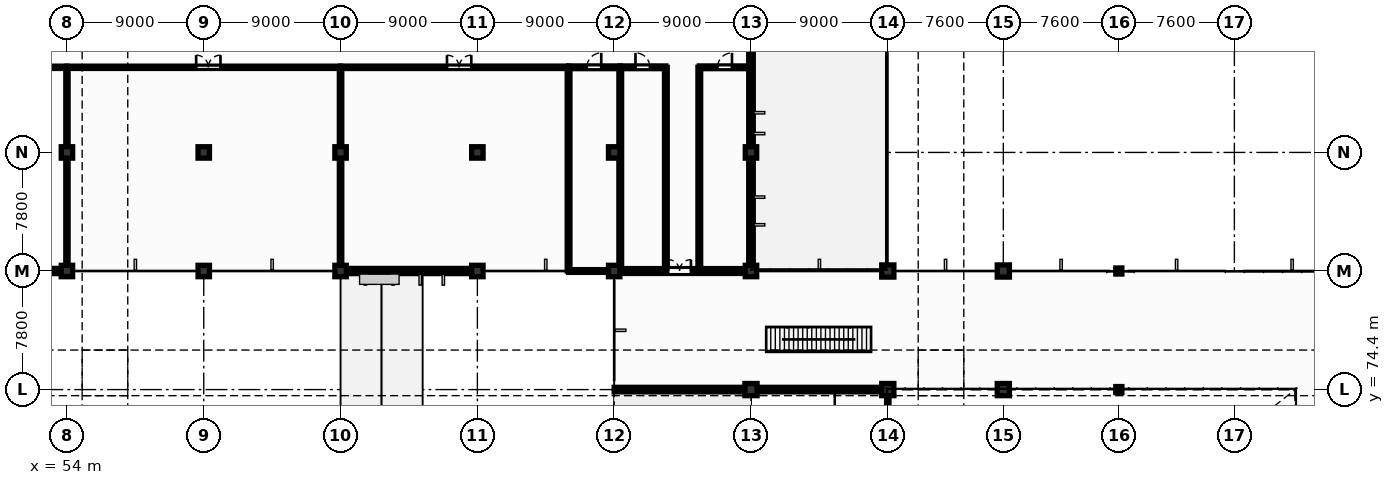
"""IFC4 building model, lengths in metres.
Left out: names, types, materials, properties, quantities, classifications, styles, units other than length and angle.
Written with IfcOpenShell. Run it as: python <this file> out.ifc"""

import sys

from ifc_helpers import new_model, si_unit, direction, frame, frame_2d, origin, origin_2d, place, context, subcontext, project, spatial, rectangle, i_section, extrude, element, fill, save


model = new_model("IFC4")
c1 = context("Model", 3, precision=1e-05, world=origin(), true_north=direction((0.0, 1.0)))
c2 = subcontext(c1, "Body", "Model", "MODEL_VIEW")
j1 = project(units=[si_unit("LENGTHUNIT", "METRE"), si_unit("PLANEANGLEUNIT", "RADIAN")], contexts=[c1])
p1 = place(None, origin())
s1 = spatial("IfcSite", under=j1, at=p1, CompositionType="ELEMENT")
p2 = place(p1, origin())
s2 = spatial("IfcBuilding", under=s1, at=p2, CompositionType="ELEMENT")
p3 = place(p2, frame((0.0, 0.0, 8.94)))
s3 = spatial("IfcBuildingStorey", under=s2, at=p3, CompositionType="ELEMENT", Elevation=8.94)
for number, where, z_axis, x_axis in (
    (1, (54.0, 82.2, 0.0), (0.0, 0.0, 1.0), (1.0, 0.0, 0.0)),
    (2, (54.0, 90.0, 0.0), (0.0, 0.0, 1.0), (1.0, 0.0, 0.0)),
    (3, (63.0, 82.2, 0.0), (0.0, 0.0, 1.0), (1.0, 0.0, 0.0)),
    (4, (63.0, 90.0, 0.0), (0.0, 0.0, 1.0), (1.0, 0.0, 0.0)),
    (5, (72.0, 82.2, 0.0), (0.0, 0.0, 1.0), (1.0, 0.0, 0.0)),
    (6, (72.0, 90.0, 0.0), (0.0, 0.0, 1.0), (1.0, 0.0, 0.0)),
    (7, (81.0, 82.2, 0.0), (0.0, 0.0, 1.0), (1.0, 0.0, 0.0)),
    (8, (81.0, 90.0, 0.0), (0.0, 0.0, 1.0), (1.0, 0.0, 0.0)),
    (9, (90.0, 82.2, 0.0), (0.0, 0.0, 1.0), (1.0, 0.0, 0.0)),
    (10, (90.0, 90.0, 0.0), (0.0, 0.0, 1.0), (1.0, 0.0, 0.0)),
):
    element("IfcColumn", number, at=place(p3, frame(where, z_axis=z_axis, x_axis=x_axis)), inside=s3, PredefinedType="COLUMN", context=c2, shape_type="SweptSolid", body=[
        extrude(rectangle(XDim=0.75, YDim=0.75, at=origin_2d()), origin(), (0.0, 0.0, 1.0), 3.84),
    ])
p4 = place(p3, frame((99.0, 74.4, 0.0), z_axis=(0.0, 0.0, 1.0), x_axis=(1.0, 0.0, 0.0)))
e11 = element("IfcColumn", 11, at=p4, inside=s3, PredefinedType="COLUMN", context=c2, shape_type="SweptSolid", body=[
    extrude(rectangle(XDim=0.8, YDim=0.8, at=origin_2d()), origin(), (0.0, 0.0, 1.0), 0.605),
])
for number, where, z_axis, x_axis in (
    (12, (99.0, 82.2, 0.0), (0.0, 0.0, 1.0), (1.0, 0.0, 0.0)),
    (13, (99.0, 90.0, 0.0), (0.0, 0.0, 1.0), (1.0, 0.0, 0.0)),
):
    element("IfcColumn", number, at=place(p3, frame(where, z_axis=z_axis, x_axis=x_axis)), inside=s3, PredefinedType="COLUMN", context=c2, shape_type="SweptSolid", body=[
        extrude(rectangle(XDim=0.75, YDim=0.75, at=origin_2d()), origin(), (0.0, 0.0, 1.0), 3.84),
    ])
for number, where, z_axis, x_axis in (
    (14, (108.0, 74.4, 0.0), (0.0, 0.0, 1.0), (1.0, 0.0, 0.0)),
    (15, (108.0, 82.2, 0.0), (0.0, 0.0, 1.0), (1.0, 0.0, 0.0)),
    (16, (115.6, 74.4, 0.0), (0.0, 0.0, 1.0), (1.0, 0.0, 0.0)),
    (17, (115.6, 82.2, 0.0), (0.0, 0.0, 1.0), (1.0, 0.0, 0.0)),
):
    element("IfcColumn", number, at=place(p3, frame(where, z_axis=z_axis, x_axis=x_axis)), inside=s3, PredefinedType="COLUMN", context=c2, shape_type="SweptSolid", body=[
        extrude(rectangle(XDim=0.8, YDim=0.8, at=origin_2d()), origin(), (0.0, 0.0, 1.0), 3.84),
    ])
for number, where, z_axis, x_axis in (
    (18, (123.2, 74.4, 0.0), (0.0, 0.0, 1.0), (1.0, 0.0, 0.0)),
    (19, (123.2, 82.2, 0.0), (0.0, 0.0, 1.0), (1.0, 0.0, 0.0)),
):
    element("IfcColumn", number, at=place(p3, frame(where, z_axis=z_axis, x_axis=x_axis)), inside=s3, PredefinedType="COLUMN", context=c2, shape_type="SweptSolid", body=[
        extrude(i_section(OverallWidth=0.401, OverallDepth=0.399, WebThickness=0.025, FlangeThickness=0.04, at=origin_2d()), origin(), (0.0, 0.0, 1.0), 3.84),
    ])
p5 = place(p3, frame((45.0, 82.2, 0.0), z_axis=(0.0, 0.0, 1.0), x_axis=(1.0, 0.0, 0.0)))
e20 = element("IfcWall", 20, at=p5, inside=s3, PredefinedType="SOLIDWALL", context=c2, shape_type="SweptSolid", body=[
    extrude(rectangle(XDim=9.0, YDim=0.34, at=frame_2d((4.5, 0.0))), origin(), (0.0, 0.0, 1.0), 3.53),
])
p6 = place(p5, frame((1.8, 0.0, 0.665)))
e21 = element("IfcOpeningElement", 21, at=p6, cuts=e20, PredefinedType="OPENING", context=c2, shape_type="SweptSolid", body=[
    extrude(rectangle(XDim=1.5, YDim=2.1, at=frame_2d((0.75, 1.05))), frame((0.0, 0.18, 0.0), z_axis=(0.0, -1.0, 0.0), x_axis=(1.0, 0.0, 0.0)), (0.0, 0.0, 1.0), 0.36),
])
p7 = place(p5, frame((5.4, 0.0, 0.665)))
e22 = element("IfcOpeningElement", 22, at=p7, cuts=e20, PredefinedType="OPENING", context=c2, shape_type="SweptSolid", body=[
    extrude(rectangle(XDim=1.2, YDim=2.1, at=frame_2d((0.6, 1.05))), frame((0.0, 0.18, 0.0), z_axis=(0.0, -1.0, 0.0), x_axis=(1.0, 0.0, 0.0)), (0.0, 0.0, 1.0), 0.36),
])
p8 = place(p3, frame((72.0, 82.2, 0.0), z_axis=(0.0, 0.0, 1.0), x_axis=(1.0, 0.0, 0.0)))
e23 = element("IfcWall", 23, at=p8, inside=s3, PredefinedType="SOLIDWALL", context=c2, shape_type="SweptSolid", body=[
    extrude(rectangle(XDim=9.0, YDim=0.34, at=frame_2d((4.5, 0.0))), origin(), (0.0, 0.0, 1.0), 3.53),
])
p9 = place(p8, frame((1.8, 0.0, 0.665)))
e24 = element("IfcOpeningElement", 24, at=p9, cuts=e23, PredefinedType="OPENING", context=c2, shape_type="SweptSolid", body=[
    extrude(rectangle(XDim=1.5, YDim=2.1, at=frame_2d((0.75, 1.05))), frame((0.0, 0.18, 0.0), z_axis=(0.0, -1.0, 0.0), x_axis=(1.0, 0.0, 0.0)), (0.0, 0.0, 1.0), 0.36),
])
p10 = place(p8, frame((5.4, 0.0, 0.665)))
e25 = element("IfcOpeningElement", 25, at=p10, cuts=e23, PredefinedType="OPENING", context=c2, shape_type="SweptSolid", body=[
    extrude(rectangle(XDim=1.2, YDim=2.1, at=frame_2d((0.6, 1.05))), frame((0.0, 0.18, 0.0), z_axis=(0.0, -1.0, 0.0), x_axis=(1.0, 0.0, 0.0)), (0.0, 0.0, 1.0), 0.36),
])
p11 = place(p3, frame((99.0, 82.2, 0.0), z_axis=(0.0, 0.0, 1.0), x_axis=(0.0, 1.0, 0.0)))
e26 = element("IfcWall", 26, at=p11, inside=s3, PredefinedType="SOLIDWALL", context=c2, shape_type="SweptSolid", body=[
    extrude(rectangle(XDim=31.8, YDim=0.3, at=frame_2d((15.9, 0.0))), origin(), (0.0, 0.0, 1.0), 2.695),
])
p12 = place(p11, frame((18.2, 0.0, 0.0)))
e27 = element("IfcOpeningElement", 27, at=p12, cuts=e26, PredefinedType="OPENING", context=c2, shape_type="SweptSolid", body=[
    extrude(rectangle(XDim=1.6, YDim=2.25, at=frame_2d((0.8, 1.125))), frame((0.0, 0.16, 0.0), z_axis=(0.0, -1.0, 0.0), x_axis=(1.0, 0.0, 0.0)), (0.0, 0.0, 1.0), 0.32),
])
p13 = place(p11, frame((3.2, 0.0, 0.475)))
e28 = element("IfcOpeningElement", 28, at=p13, cuts=e26, PredefinedType="OPENING", context=c2, shape_type="SweptSolid", body=[
    extrude(rectangle(XDim=1.5, YDim=2.1, at=frame_2d((0.75, 1.05))), frame((0.0, 0.16, 0.0), z_axis=(0.0, -1.0, 0.0), x_axis=(1.0, 0.0, 0.0)), (0.0, 0.0, 1.0), 0.32),
])
p14 = place(p11, frame((9.2, 0.0, 0.825)))
e29 = element("IfcOpeningElement", 29, at=p14, cuts=e26, PredefinedType="OPENING", context=c2, shape_type="SweptSolid", body=[
    extrude(rectangle(XDim=1.05, YDim=1.75, at=frame_2d((0.525, 0.875))), frame((0.0, 0.16, 0.0), z_axis=(0.0, -1.0, 0.0), x_axis=(1.0, 0.0, 0.0)), (0.0, 0.0, 1.0), 0.32),
])
p15 = place(p3, frame((90.0, 74.4, 0.0), z_axis=(0.0, 0.0, 1.0), x_axis=(1.0, 0.0, 0.0)))
e30 = element("IfcWall", 30, at=p15, inside=s3, PredefinedType="SOLIDWALL", context=c2, shape_type="SweptSolid", body=[
    extrude(rectangle(XDim=18.0, YDim=0.3, at=frame_2d((9.0, 0.0))), origin(), (0.0, 0.0, 1.0), 4.65),
])
p16 = place(p15, frame((3.0, 0.0, 3.23)))
e31 = element("IfcOpeningElement", 31, at=p16, cuts=e30, PredefinedType="OPENING", context=c2, shape_type="SweptSolid", body=[
    extrude(rectangle(XDim=2.6, YDim=1.3, at=frame_2d((1.3, 0.65))), frame((0.0, 0.16, 0.0), z_axis=(0.0, -1.0, 0.0), x_axis=(1.0, 0.0, 0.0)), (0.0, 0.0, 1.0), 0.32),
])
p17 = place(p15, frame((11.0, 0.0, 3.23)))
e32 = element("IfcOpeningElement", 32, at=p17, cuts=e30, PredefinedType="OPENING", context=c2, shape_type="SweptSolid", body=[
    extrude(rectangle(XDim=2.6, YDim=1.3, at=frame_2d((1.3, 0.65))), frame((0.0, 0.16, 0.0), z_axis=(0.0, -1.0, 0.0), x_axis=(1.0, 0.0, 0.0)), (0.0, 0.0, 1.0), 0.32),
])
p18 = place(p3, frame((90.0, 82.2, 0.0), z_axis=(0.0, 0.0, 1.0), x_axis=(1.0, 0.0, 0.0)))
e33 = element("IfcWall", 33, at=p18, inside=s3, PredefinedType="SHEAR", context=c2, shape_type="SweptSolid", body=[
    extrude(rectangle(XDim=9.0, YDim=0.32, at=frame_2d((4.5, 0.0))), origin(), (0.0, 0.0, 1.0), 3.53),
])
p19 = place(p18, frame((3.55, 0.0, 0.0)))
e34 = element("IfcOpeningElement", 34, at=p19, cuts=e33, PredefinedType="OPENING", context=c2, shape_type="SweptSolid", body=[
    extrude(rectangle(XDim=1.5, YDim=2.2, at=frame_2d((0.75, 1.1))), frame((0.0, 0.17, 0.0), z_axis=(0.0, -1.0, 0.0), x_axis=(1.0, 0.0, 0.0)), (0.0, 0.0, 1.0), 0.34),
])
p20 = place(p3, frame((36.0, 95.6, 0.0), z_axis=(0.0, 0.0, 1.0), x_axis=(1.0, 0.0, 0.0)))
e35 = element("IfcWall", 35, at=p20, inside=s3, PredefinedType="PARTITIONING", context=c2, shape_type="SweptSolid", body=[
    extrude(rectangle(XDim=18.0, YDim=0.15, at=frame_2d((9.0, 0.0))), origin(), (0.0, 0.0, 1.0), 2.705),
])
p21 = place(p20, frame((8.5, 0.0, 0.0)))
e36 = element("IfcOpeningElement", 36, at=p21, cuts=e35, PredefinedType="OPENING", context=c2, shape_type="SweptSolid", body=[
    extrude(rectangle(XDim=1.6, YDim=2.2, at=frame_2d((0.8, 1.1))), frame((0.0, 0.085, 0.0), z_axis=(0.0, -1.0, 0.0), x_axis=(1.0, 0.0, 0.0)), (0.0, 0.0, 1.0), 0.17),
])
p22 = place(p3, frame((54.0, 95.6, 0.0), z_axis=(0.0, 0.0, 1.0), x_axis=(1.0, 0.0, 0.0)))
e37 = element("IfcWall", 37, at=p22, inside=s3, PredefinedType="PARTITIONING", context=c2, shape_type="SweptSolid", body=[
    extrude(rectangle(XDim=18.0, YDim=0.15, at=frame_2d((9.0, 0.0))), origin(), (0.0, 0.0, 1.0), 2.705),
])
p23 = place(p22, frame((8.5, 0.0, 0.0)))
e38 = element("IfcOpeningElement", 38, at=p23, cuts=e37, PredefinedType="OPENING", context=c2, shape_type="SweptSolid", body=[
    extrude(rectangle(XDim=1.6, YDim=2.2, at=frame_2d((0.8, 1.1))), frame((0.0, 0.085, 0.0), z_axis=(0.0, -1.0, 0.0), x_axis=(1.0, 0.0, 0.0)), (0.0, 0.0, 1.0), 0.17),
])
p24 = place(p3, frame((54.0, 82.2, 0.0), z_axis=(0.0, 0.0, 1.0), x_axis=(0.0, 1.0, 0.0)))
e39 = element("IfcWall", 39, at=p24, inside=s3, PredefinedType="PARTITIONING", context=c2, shape_type="SweptSolid", body=[
    extrude(rectangle(XDim=13.4, YDim=0.15, at=frame_2d((6.7, 0.0))), origin(), (0.0, 0.0, 1.0), 2.705),
])
p25 = place(p3, frame((72.0, 95.6, 0.0), z_axis=(0.0, 0.0, 1.0), x_axis=(1.0, 0.0, 0.0)))
e40 = element("IfcWall", 40, at=p25, inside=s3, PredefinedType="PARTITIONING", context=c2, shape_type="SweptSolid", body=[
    extrude(rectangle(XDim=15.0, YDim=0.16, at=frame_2d((7.5, 0.0))), origin(), (0.0, 0.0, 1.0), 2.705),
])
p26 = place(p25, frame((7.0, 0.0, 0.0)))
e41 = element("IfcOpeningElement", 41, at=p26, cuts=e40, PredefinedType="OPENING", context=c2, shape_type="SweptSolid", body=[
    extrude(rectangle(XDim=1.6, YDim=2.2, at=frame_2d((0.8, 1.1))), frame((0.0, 0.09, 0.0), z_axis=(0.0, -1.0, 0.0), x_axis=(1.0, 0.0, 0.0)), (0.0, 0.0, 1.0), 0.18),
])
p27 = place(p3, frame((72.0, 82.2, 0.0), z_axis=(0.0, 0.0, 1.0), x_axis=(0.0, 1.0, 0.0)))
e42 = element("IfcWall", 42, at=p27, inside=s3, PredefinedType="PARTITIONING", context=c2, shape_type="SweptSolid", body=[
    extrude(rectangle(XDim=13.4, YDim=0.16, at=frame_2d((6.7, 0.0))), origin(), (0.0, 0.0, 1.0), 2.805),
])
p28 = place(p3, frame((87.0, 95.6, 0.0), z_axis=(0.0, 0.0, 1.0), x_axis=(1.0, 0.0, 0.0)))
e43 = element("IfcWall", 43, at=p28, inside=s3, PredefinedType="PLUMBINGWALL", context=c2, shape_type="SweptSolid", body=[
    extrude(rectangle(XDim=3.4, YDim=0.18, at=frame_2d((1.7, 0.0))), origin(), (0.0, 0.0, 1.0), 3.53),
])
p29 = place(p28, frame((1.2, 0.0, 0.0)))
e44 = element("IfcOpeningElement", 44, at=p29, cuts=e43, PredefinedType="OPENING", context=c2, shape_type="SweptSolid", body=[
    extrude(rectangle(XDim=0.95, YDim=2.15, at=frame_2d((0.475, 1.075))), frame((0.0, 0.1, 0.0), z_axis=(0.0, -1.0, 0.0), x_axis=(1.0, 0.0, 0.0)), (0.0, 0.0, 1.0), 0.2),
])
p30 = place(p3, frame((87.0, 82.2, 0.0), z_axis=(0.0, 0.0, 1.0), x_axis=(0.0, 1.0, 0.0)))
e45 = element("IfcWall", 45, at=p30, inside=s3, PredefinedType="PLUMBINGWALL", context=c2, shape_type="SweptSolid", body=[
    extrude(rectangle(XDim=13.4, YDim=0.18, at=frame_2d((6.7, 0.0))), origin(), (0.0, 0.0, 1.0), 3.53),
])
p31 = place(p3, frame((90.4, 95.6, 0.0), z_axis=(0.0, 0.0, 1.0), x_axis=(1.0, 0.0, 0.0)))
e46 = element("IfcWall", 46, at=p31, inside=s3, PredefinedType="PLUMBINGWALL", context=c2, shape_type="SweptSolid", body=[
    extrude(rectangle(XDim=3.0, YDim=0.18, at=frame_2d((1.5, 0.0))), origin(), (0.0, 0.0, 1.0), 3.53),
])
p32 = place(p31, frame((1.0, 0.0, 0.0)))
e47 = element("IfcOpeningElement", 47, at=p32, cuts=e46, PredefinedType="OPENING", context=c2, shape_type="SweptSolid", body=[
    extrude(rectangle(XDim=0.95, YDim=2.15, at=frame_2d((0.475, 1.075))), frame((0.0, 0.1, 0.0), z_axis=(0.0, -1.0, 0.0), x_axis=(1.0, 0.0, 0.0)), (0.0, 0.0, 1.0), 0.2),
])
for number, where, z_axis, x_axis in (
    (48, (90.4, 82.2, 0.0), (0.0, 0.0, 1.0), (0.0, 1.0, 0.0)),
    (49, (93.4, 82.2, 0.0), (0.0, 0.0, 1.0), (0.0, 1.0, 0.0)),
):
    element("IfcWall", number, at=place(p3, frame(where, z_axis=z_axis, x_axis=x_axis)), inside=s3, PredefinedType="PLUMBINGWALL", context=c2, shape_type="SweptSolid", body=[
        extrude(rectangle(XDim=13.4, YDim=0.18, at=frame_2d((6.7, 0.0))), origin(), (0.0, 0.0, 1.0), 3.53),
    ])
p33 = place(p3, frame((95.6, 95.6, 0.0), z_axis=(0.0, 0.0, 1.0), x_axis=(1.0, 0.0, 0.0)))
e50 = element("IfcWall", 50, at=p33, inside=s3, PredefinedType="PLUMBINGWALL", context=c2, shape_type="SweptSolid", body=[
    extrude(rectangle(XDim=3.4, YDim=0.18, at=frame_2d((1.7, 0.0))), origin(), (0.0, 0.0, 1.0), 3.53),
])
p34 = place(p33, frame((1.2, 0.0, 0.0)))
e51 = element("IfcOpeningElement", 51, at=p34, cuts=e50, PredefinedType="OPENING", context=c2, shape_type="SweptSolid", body=[
    extrude(rectangle(XDim=0.95, YDim=2.15, at=frame_2d((0.475, 1.075))), frame((0.0, 0.1, 0.0), z_axis=(0.0, -1.0, 0.0), x_axis=(1.0, 0.0, 0.0)), (0.0, 0.0, 1.0), 0.2),
])
p35 = place(p3, frame((95.6, 82.2, 0.0), z_axis=(0.0, 0.0, 1.0), x_axis=(0.0, 1.0, 0.0)))
e52 = element("IfcWall", 52, at=p35, inside=s3, PredefinedType="PLUMBINGWALL", context=c2, shape_type="SweptSolid", body=[
    extrude(rectangle(XDim=13.4, YDim=0.18, at=frame_2d((6.7, 0.0))), origin(), (0.0, 0.0, 1.0), 3.53),
])
p36 = place(p3, frame((87.0, 82.2, 0.0), z_axis=(0.0, 0.0, 1.0), x_axis=(1.0, 0.0, 0.0)))
e53 = element("IfcWall", 53, at=p36, inside=s3, PredefinedType="PLUMBINGWALL", context=c2, shape_type="SweptSolid", body=[
    extrude(rectangle(XDim=3.0, YDim=0.18, at=frame_2d((1.5, 0.0))), origin(), (0.0, 0.0, 1.0), 2.805),
])
p37 = place(p3, frame((108.0, 53.0, 0.0), z_axis=(0.0, 0.0, 1.0), x_axis=(0.0, 1.0, 0.0)))
e54 = element("IfcWall", 54, at=p37, inside=s3, PredefinedType="PARTITIONING", context=c2, shape_type="SweptSolid", body=[
    extrude(rectangle(XDim=21.4, YDim=0.16, at=frame_2d((10.7, 0.0))), origin(), (0.0, 0.0, 1.0), 3.53),
])
p38 = place(p9, origin())
e55 = element("IfcWindow", 55, at=p38, inside=s3, PartitioningType="SINGLE_PANEL", PredefinedType="WINDOW", context=c2, shape_type="SweptSolid", body=[
    extrude(rectangle(XDim=1.5, YDim=2.1, at=frame_2d((0.75, 1.05))), frame((0.0, 0.03, 0.0), z_axis=(0.0, -1.0, 0.0), x_axis=(1.0, 0.0, 0.0)), (0.0, 0.0, 1.0), 0.06),
])
fill(e24, e55)
p39 = place(p10, origin())
e56 = element("IfcWindow", 56, at=p39, inside=s3, PartitioningType="SINGLE_PANEL", PredefinedType="WINDOW", context=c2, shape_type="SweptSolid", body=[
    extrude(rectangle(XDim=1.2, YDim=2.1, at=frame_2d((0.6, 1.05))), frame((0.0, 0.03, 0.0), z_axis=(0.0, -1.0, 0.0), x_axis=(1.0, 0.0, 0.0)), (0.0, 0.0, 1.0), 0.06),
])
fill(e25, e56)
p40 = place(p13, origin())
e57 = element("IfcWindow", 57, at=p40, inside=s3, PartitioningType="SINGLE_PANEL", PredefinedType="WINDOW", context=c2, shape_type="SweptSolid", body=[
    extrude(rectangle(XDim=1.5, YDim=2.1, at=frame_2d((0.75, 1.05))), frame((0.0, 0.03, 0.0), z_axis=(0.0, -1.0, 0.0), x_axis=(1.0, 0.0, 0.0)), (0.0, 0.0, 1.0), 0.06),
])
fill(e28, e57)
p41 = place(p14, origin())
e58 = element("IfcWindow", 58, at=p41, inside=s3, PartitioningType="SINGLE_PANEL", PredefinedType="WINDOW", context=c2, shape_type="SweptSolid", body=[
    extrude(rectangle(XDim=1.05, YDim=1.75, at=frame_2d((0.525, 0.875))), frame((0.0, 0.03, 0.0), z_axis=(0.0, -1.0, 0.0), x_axis=(1.0, 0.0, 0.0)), (0.0, 0.0, 1.0), 0.06),
])
fill(e29, e58)
p42 = place(p16, origin())
e59 = element("IfcWindow", 59, at=p42, inside=s3, PartitioningType="SINGLE_PANEL", PredefinedType="WINDOW", context=c2, shape_type="SweptSolid", body=[
    extrude(rectangle(XDim=2.6, YDim=1.3, at=frame_2d((1.3, 0.65))), frame((0.0, 0.03, 0.0), z_axis=(0.0, -1.0, 0.0), x_axis=(1.0, 0.0, 0.0)), (0.0, 0.0, 1.0), 0.06),
])
fill(e31, e59)
p43 = place(p17, origin())
e60 = element("IfcWindow", 60, at=p43, inside=s3, PartitioningType="SINGLE_PANEL", PredefinedType="WINDOW", context=c2, shape_type="SweptSolid", body=[
    extrude(rectangle(XDim=2.6, YDim=1.3, at=frame_2d((1.3, 0.65))), frame((0.0, 0.03, 0.0), z_axis=(0.0, -1.0, 0.0), x_axis=(1.0, 0.0, 0.0)), (0.0, 0.0, 1.0), 0.06),
])
fill(e32, e60)
p44 = place(p19, origin())
e61 = element("IfcDoor", 61, at=p44, inside=s3, OperationType="DOUBLE_DOOR_SINGLE_SWING", PredefinedType="DOOR", context=c2, shape_type="SweptSolid", body=[
    extrude(rectangle(XDim=1.5, YDim=2.2, at=frame_2d((0.75, 1.1))), frame((0.0, 0.025, 0.0), z_axis=(0.0, -1.0, 0.0), x_axis=(1.0, 0.0, 0.0)), (0.0, 0.0, 1.0), 0.05),
])
fill(e34, e61)
p45 = place(p23, origin())
e62 = element("IfcDoor", 62, at=p45, inside=s3, OperationType="DOUBLE_DOOR_SINGLE_SWING", PredefinedType="DOOR", context=c2, shape_type="SweptSolid", body=[
    extrude(rectangle(XDim=1.6, YDim=2.2, at=frame_2d((0.8, 1.1))), frame((0.0, 0.025, 0.0), z_axis=(0.0, -1.0, 0.0), x_axis=(1.0, 0.0, 0.0)), (0.0, 0.0, 1.0), 0.05),
])
fill(e38, e62)
p46 = place(p26, origin())
e63 = element("IfcDoor", 63, at=p46, inside=s3, OperationType="DOUBLE_DOOR_SINGLE_SWING", PredefinedType="DOOR", context=c2, shape_type="SweptSolid", body=[
    extrude(rectangle(XDim=1.6, YDim=2.2, at=frame_2d((0.8, 1.1))), frame((0.0, 0.025, 0.0), z_axis=(0.0, -1.0, 0.0), x_axis=(1.0, 0.0, 0.0)), (0.0, 0.0, 1.0), 0.05),
])
fill(e41, e63)
p47 = place(p29, origin())
e64 = element("IfcDoor", 64, at=p47, inside=s3, OperationType="SINGLE_SWING_RIGHT", PredefinedType="DOOR", context=c2, shape_type="SweptSolid", body=[
    extrude(rectangle(XDim=0.95, YDim=2.15, at=frame_2d((0.475, 1.075))), frame((0.0, 0.025, 0.0), z_axis=(0.0, -1.0, 0.0), x_axis=(1.0, 0.0, 0.0)), (0.0, 0.0, 1.0), 0.05),
])
fill(e44, e64)
p48 = place(p32, origin())
e65 = element("IfcDoor", 65, at=p48, inside=s3, OperationType="SINGLE_SWING_LEFT", PredefinedType="DOOR", context=c2, shape_type="SweptSolid", body=[
    extrude(rectangle(XDim=0.95, YDim=2.15, at=frame_2d((0.475, 1.075))), frame((0.0, 0.025, 0.0), z_axis=(0.0, -1.0, 0.0), x_axis=(1.0, 0.0, 0.0)), (0.0, 0.0, 1.0), 0.05),
])
fill(e47, e65)
p49 = place(p34, origin())
e66 = element("IfcDoor", 66, at=p49, inside=s3, OperationType="SINGLE_SWING_RIGHT", PredefinedType="DOOR", context=c2, shape_type="SweptSolid", body=[
    extrude(rectangle(XDim=0.95, YDim=2.15, at=frame_2d((0.475, 1.075))), frame((0.0, 0.025, 0.0), z_axis=(0.0, -1.0, 0.0), x_axis=(1.0, 0.0, 0.0)), (0.0, 0.0, 1.0), 0.05),
])
fill(e51, e66)
save(model, sys.argv[1])
